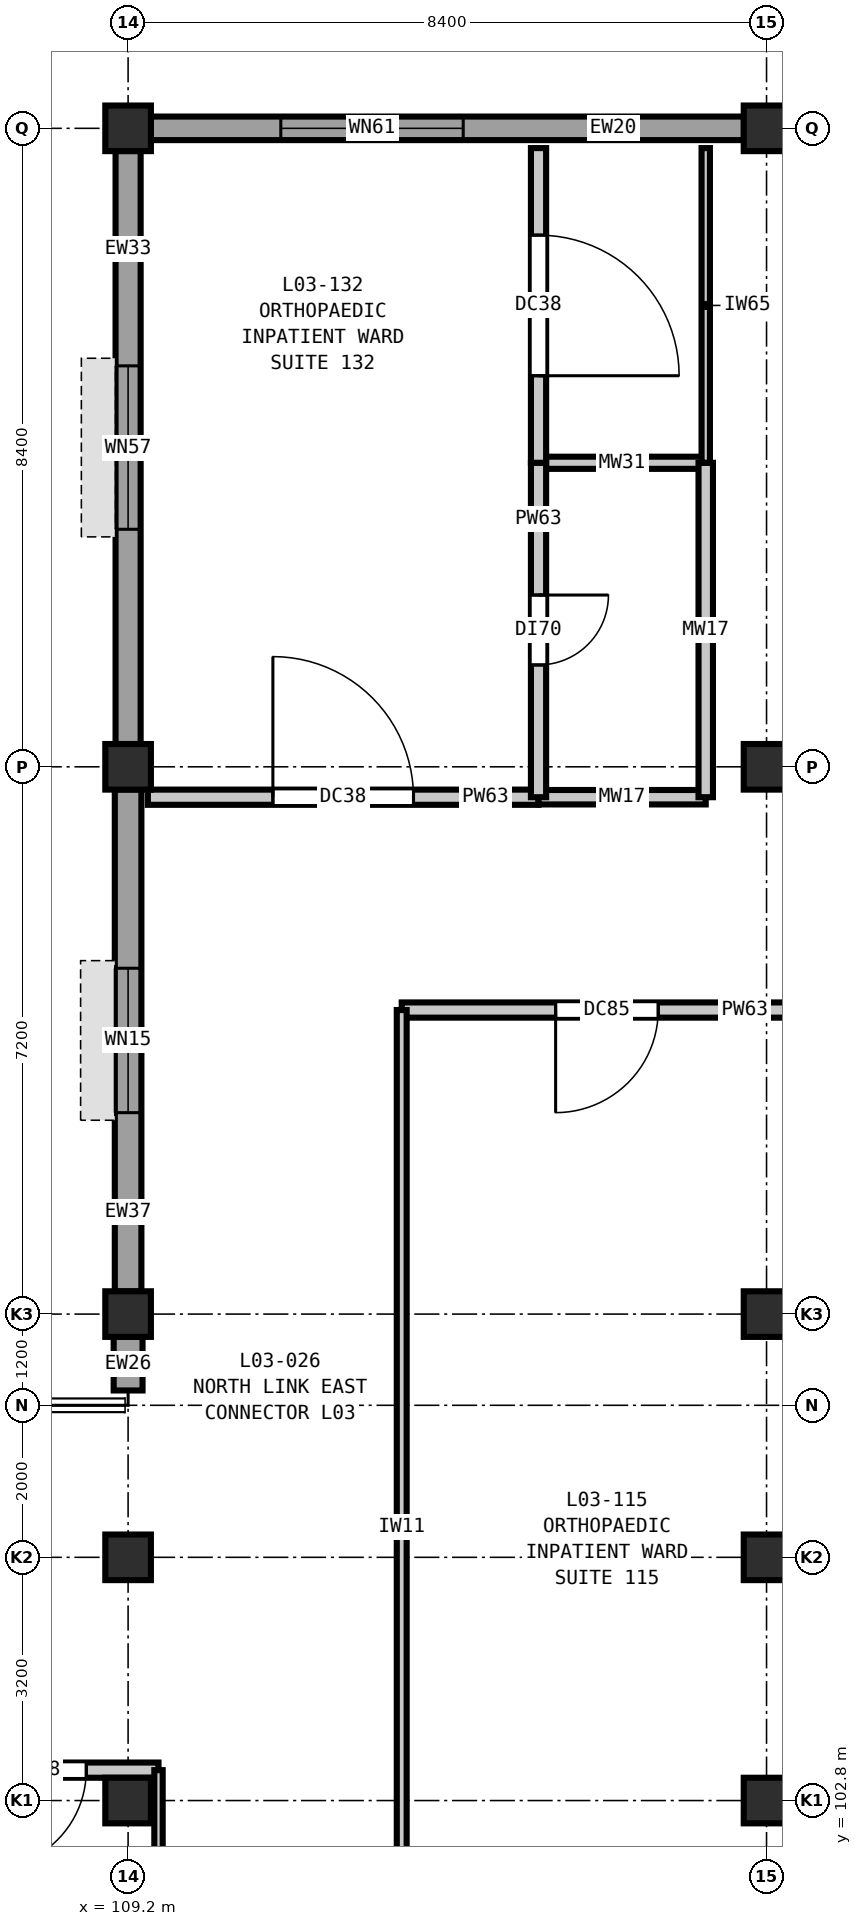
"""IFC4 building model, lengths in metres.
Left out: names, types, materials, properties, quantities, classifications, styles, units other than length and angle.
Written with IfcOpenShell. Run it as: python <this file> out.ifc"""

import sys

from ifc_helpers import new_model, si_unit, direction, frame, frame_2d, origin, origin_2d, place, context, subcontext, project, spatial, rectangle, extrude, element, fill, save


model = new_model("IFC4")
c1 = context("Model", 3, precision=1e-05, world=origin(), true_north=direction((0.0, 1.0)))
c2 = subcontext(c1, "Body", "Model", "MODEL_VIEW")
j1 = project(units=[si_unit("LENGTHUNIT", "METRE"), si_unit("PLANEANGLEUNIT", "RADIAN")], contexts=[c1])
p1 = place(None, origin())
s1 = spatial("IfcSite", under=j1, at=p1, CompositionType="ELEMENT")
p2 = place(p1, origin())
s2 = spatial("IfcBuilding", under=s1, at=p2, CompositionType="ELEMENT")
p3 = place(p2, frame((0.0, 0.0, 16.2)))
s3 = spatial("IfcBuildingStorey", under=s2, at=p3, CompositionType="ELEMENT", Elevation=16.2)
for number, where, z_axis, x_axis in (
    (1, (109.2, 102.8, 0.0), (0.0, 0.0, 1.0), (1.0, 0.0, 0.0)),
    (2, (109.2, 106.0, 0.0), (0.0, 0.0, 1.0), (1.0, 0.0, 0.0)),
    (3, (109.2, 109.2, 0.0), (0.0, 0.0, 1.0), (1.0, 0.0, 0.0)),
    (4, (109.2, 116.4, 0.0), (0.0, 0.0, 1.0), (1.0, 0.0, 0.0)),
    (5, (109.2, 124.8, 0.0), (0.0, 0.0, 1.0), (1.0, 0.0, 0.0)),
    (6, (117.6, 102.8, 0.0), (0.0, 0.0, 1.0), (1.0, 0.0, 0.0)),
    (7, (117.6, 106.0, 0.0), (0.0, 0.0, 1.0), (1.0, 0.0, 0.0)),
    (8, (117.6, 109.2, 0.0), (0.0, 0.0, 1.0), (1.0, 0.0, 0.0)),
    (9, (117.6, 116.4, 0.0), (0.0, 0.0, 1.0), (1.0, 0.0, 0.0)),
    (10, (117.6, 124.8, 0.0), (0.0, 0.0, 1.0), (1.0, 0.0, 0.0)),
):
    element("IfcColumn", number, at=place(p3, frame(where, z_axis=z_axis, x_axis=x_axis)), inside=s3, PredefinedType="COLUMN", context=c2, shape_type="SweptSolid", body=[
        extrude(rectangle(XDim=0.6, YDim=0.6, at=origin_2d()), origin(), (0.0, 0.0, 1.0), 4.2),
    ])
p4 = place(p3, frame((109.2, 108.195, 0.0), z_axis=(0.0, 0.0, 1.0), x_axis=(0.0, 1.0, 0.0)))
e11 = element("IfcWall", 11, at=p4, inside=s3, PredefinedType="SOLIDWALL", context=c2, shape_type="SweptSolid", body=[
    extrude(rectangle(XDim=0.707, YDim=0.38, at=frame_2d((0.354, 0.0))), origin(), (0.0, 0.0, 1.0), 3.48),
])
p5 = place(p3, frame((109.2, 109.498, 0.0), z_axis=(0.0, 0.0, 1.0), x_axis=(0.0, 1.0, 0.0)))
e12 = element("IfcWall", 12, at=p5, inside=s3, PredefinedType="SOLIDWALL", context=c2, shape_type="SweptSolid", body=[
    extrude(rectangle(XDim=6.604, YDim=0.35, at=frame_2d((3.302, 0.0))), origin(), (0.0, 0.0, 1.0), 3.48),
])
p6 = place(p5, frame((2.352, 0.0, 0.9)))
e13 = element("IfcOpeningElement", 13, at=p6, cuts=e12, PredefinedType="OPENING", context=c2, shape_type="SweptSolid", body=[
    extrude(rectangle(XDim=1.9, YDim=2.15, at=frame_2d((0.95, 1.075))), frame((0.0, 0.185, 0.0), z_axis=(0.0, -1.0, 0.0), x_axis=(1.0, 0.0, 0.0)), (0.0, 0.0, 1.0), 0.37),
])
p7 = place(p3, frame((109.2, 116.698, 0.0), z_axis=(0.0, 0.0, 1.0), x_axis=(0.0, 1.0, 0.0)))
e14 = element("IfcWall", 14, at=p7, inside=s3, PredefinedType="SOLIDWALL", context=c2, shape_type="SweptSolid", body=[
    extrude(rectangle(XDim=7.804, YDim=0.33, at=frame_2d((3.902, 0.0))), origin(), (0.0, 0.0, 1.0), 3.48),
])
p8 = place(p7, frame((2.827, 0.0, 0.9)))
e15 = element("IfcOpeningElement", 15, at=p8, cuts=e14, PredefinedType="OPENING", context=c2, shape_type="SweptSolid", body=[
    extrude(rectangle(XDim=2.15, YDim=2.15, at=frame_2d((1.075, 1.075))), frame((0.0, 0.175, 0.0), z_axis=(0.0, -1.0, 0.0), x_axis=(1.0, 0.0, 0.0)), (0.0, 0.0, 1.0), 0.35),
])
p9 = place(p3, frame((109.498, 124.8, 0.0), z_axis=(0.0, 0.0, 1.0), x_axis=(1.0, 0.0, 0.0)))
e16 = element("IfcWall", 16, at=p9, inside=s3, PredefinedType="SOLIDWALL", context=c2, shape_type="SweptSolid", body=[
    extrude(rectangle(XDim=7.804, YDim=0.31, at=frame_2d((3.902, 0.0))), origin(), (0.0, 0.0, 1.0), 3.48),
])
p10 = place(p9, frame((1.711, 0.0, 0.9)))
e17 = element("IfcOpeningElement", 17, at=p10, cuts=e16, PredefinedType="OPENING", context=c2, shape_type="SweptSolid", body=[
    extrude(rectangle(XDim=2.4, YDim=2.15, at=frame_2d((1.2, 1.075))), frame((0.0, 0.165, 0.0), z_axis=(0.0, -1.0, 0.0), x_axis=(1.0, 0.0, 0.0)), (0.0, 0.0, 1.0), 0.33),
])
p11 = place(p3, frame((106.4, 103.2, 0.0), z_axis=(0.0, 0.0, 1.0), x_axis=(1.0, 0.0, 0.0)))
e18 = element("IfcWall", 18, at=p11, inside=s3, PredefinedType="PARTITIONING", context=c2, shape_type="SweptSolid", body=[
    extrude(rectangle(XDim=3.2, YDim=0.2, at=frame_2d((1.6, 0.0))), origin(), (0.0, 0.0, 1.0), 3.89),
])
p12 = place(p11, frame((0.95, 0.0, 0.0)))
e19 = element("IfcOpeningElement", 19, at=p12, cuts=e18, PredefinedType="OPENING", context=c2, shape_type="SweptSolid", body=[
    extrude(rectangle(XDim=1.3, YDim=2.2, at=frame_2d((0.65, 1.1))), frame((0.0, 0.11, 0.0), z_axis=(0.0, -1.0, 0.0), x_axis=(1.0, 0.0, 0.0)), (0.0, 0.0, 1.0), 0.22),
])
p13 = place(p3, frame((112.8, 113.2, 0.0), z_axis=(0.0, 0.0, 1.0), x_axis=(1.0, 0.0, 0.0)))
e20 = element("IfcWall", 20, at=p13, inside=s3, PredefinedType="PARTITIONING", context=c2, shape_type="SweptSolid", body=[
    extrude(rectangle(XDim=5.4, YDim=0.2, at=frame_2d((2.7, 0.0))), origin(), (0.0, 0.0, 1.0), 3.89),
])
p14 = place(p13, frame((2.025, 0.0, 0.0)))
e21 = element("IfcOpeningElement", 21, at=p14, cuts=e20, PredefinedType="OPENING", context=c2, shape_type="SweptSolid", body=[
    extrude(rectangle(XDim=1.35, YDim=2.2, at=frame_2d((0.675, 1.1))), frame((0.0, 0.11, 0.0), z_axis=(0.0, -1.0, 0.0), x_axis=(1.0, 0.0, 0.0)), (0.0, 0.0, 1.0), 0.22),
])
p15 = place(p3, frame((109.46, 116.0, 0.0), z_axis=(0.0, 0.0, 1.0), x_axis=(1.0, 0.0, 0.0)))
e22 = element("IfcWall", 22, at=p15, inside=s3, PredefinedType="PARTITIONING", context=c2, shape_type="SweptSolid", body=[
    extrude(rectangle(XDim=5.14, YDim=0.2, at=frame_2d((2.57, 0.0))), origin(), (0.0, 0.0, 1.0), 3.89),
])
p16 = place(p15, frame((1.645, 0.0, 0.0)))
e23 = element("IfcOpeningElement", 23, at=p16, cuts=e22, PredefinedType="OPENING", context=c2, shape_type="SweptSolid", body=[
    extrude(rectangle(XDim=1.85, YDim=2.3, at=frame_2d((0.925, 1.15))), frame((0.0, 0.11, 0.0), z_axis=(0.0, -1.0, 0.0), x_axis=(1.0, 0.0, 0.0)), (0.0, 0.0, 1.0), 0.22),
])
p17 = place(p3, frame((114.6, 116.0, 0.0), z_axis=(0.0, 0.0, 1.0), x_axis=(1.0, 0.0, 0.0)))
e24 = element("IfcWall", 24, at=p17, inside=s3, PredefinedType="PLUMBINGWALL", context=c2, shape_type="SweptSolid", body=[
    extrude(rectangle(XDim=2.2, YDim=0.19, at=frame_2d((1.1, 0.0))), origin(), (0.0, 0.0, 1.0), 3.89),
])
p18 = place(p3, frame((114.6, 120.4, 0.0), z_axis=(0.0, 0.0, 1.0), x_axis=(1.0, 0.0, 0.0)))
e25 = element("IfcWall", 25, at=p18, inside=s3, PredefinedType="PLUMBINGWALL", context=c2, shape_type="SweptSolid", body=[
    extrude(rectangle(XDim=2.2, YDim=0.16, at=frame_2d((1.1, 0.0))), origin(), (0.0, 0.0, 1.0), 3.89),
])
p19 = place(p3, frame((109.6, 99.6, 0.0), z_axis=(0.0, 0.0, 1.0), x_axis=(0.0, 1.0, 0.0)))
e26 = element("IfcWall", 26, at=p19, inside=s3, PredefinedType="PARTITIONING", context=c2, shape_type="SweptSolid", body=[
    extrude(rectangle(XDim=3.6, YDim=0.11, at=frame_2d((1.8, 0.0))), origin(), (0.0, 0.0, 1.0), 3.89),
])
p20 = place(p3, frame((112.8, 99.6, 0.0), z_axis=(0.0, 0.0, 1.0), x_axis=(0.0, 1.0, 0.0)))
e27 = element("IfcWall", 27, at=p20, inside=s3, PredefinedType="PARTITIONING", context=c2, shape_type="SweptSolid", body=[
    extrude(rectangle(XDim=13.6, YDim=0.13, at=frame_2d((6.8, 0.0))), origin(), (0.0, 0.0, 1.0), 3.89),
])
p21 = place(p3, frame((114.6, 116.0, 0.0), z_axis=(0.0, 0.0, 1.0), x_axis=(0.0, 1.0, 0.0)))
e28 = element("IfcWall", 28, at=p21, inside=s3, PredefinedType="PARTITIONING", context=c2, shape_type="SweptSolid", body=[
    extrude(rectangle(XDim=4.4, YDim=0.2, at=frame_2d((2.2, 0.0))), origin(), (0.0, 0.0, 1.0), 3.89),
])
p22 = place(p21, frame((1.74, 0.0, 0.0)))
e29 = element("IfcOpeningElement", 29, at=p22, cuts=e28, PredefinedType="OPENING", context=c2, shape_type="SweptSolid", body=[
    extrude(rectangle(XDim=0.92, YDim=2.1, at=frame_2d((0.46, 1.05))), frame((0.0, 0.11, 0.0), z_axis=(0.0, -1.0, 0.0), x_axis=(1.0, 0.0, 0.0)), (0.0, 0.0, 1.0), 0.22),
])
p23 = place(p3, frame((114.6, 120.4, 0.0), z_axis=(0.0, 0.0, 1.0), x_axis=(0.0, 1.0, 0.0)))
e30 = element("IfcWall", 30, at=p23, inside=s3, PredefinedType="PARTITIONING", context=c2, shape_type="SweptSolid", body=[
    extrude(rectangle(XDim=4.14, YDim=0.2, at=frame_2d((2.07, 0.0))), origin(), (0.0, 0.0, 1.0), 3.89),
])
p24 = place(p23, frame((1.145, 0.0, 0.0)))
e31 = element("IfcOpeningElement", 31, at=p24, cuts=e30, PredefinedType="OPENING", context=c2, shape_type="SweptSolid", body=[
    extrude(rectangle(XDim=1.85, YDim=2.3, at=frame_2d((0.925, 1.15))), frame((0.0, 0.11, 0.0), z_axis=(0.0, -1.0, 0.0), x_axis=(1.0, 0.0, 0.0)), (0.0, 0.0, 1.0), 0.22),
])
p25 = place(p3, frame((116.8, 116.0, 0.0), z_axis=(0.0, 0.0, 1.0), x_axis=(0.0, 1.0, 0.0)))
e32 = element("IfcWall", 32, at=p25, inside=s3, PredefinedType="PLUMBINGWALL", context=c2, shape_type="SweptSolid", body=[
    extrude(rectangle(XDim=4.4, YDim=0.19, at=frame_2d((2.2, 0.0))), origin(), (0.0, 0.0, 1.0), 3.89),
])
p26 = place(p3, frame((116.8, 120.4, 0.0), z_axis=(0.0, 0.0, 1.0), x_axis=(0.0, 1.0, 0.0)))
e33 = element("IfcWall", 33, at=p26, inside=s3, PredefinedType="PARTITIONING", context=c2, shape_type="SweptSolid", body=[
    extrude(rectangle(XDim=4.14, YDim=0.11, at=frame_2d((2.07, 0.0))), origin(), (0.0, 0.0, 1.0), 3.89),
])
p27 = place(p6, origin())
e34 = element("IfcWindow", 34, at=p27, inside=s3, PartitioningType="DOUBLE_PANEL_VERTICAL", PredefinedType="WINDOW", context=c2, shape_type="SweptSolid", body=[
    extrude(rectangle(XDim=1.9, YDim=2.15, at=frame_2d((0.95, 1.075))), frame((0.0, 0.03, 0.0), z_axis=(0.0, -1.0, 0.0), x_axis=(1.0, 0.0, 0.0)), (0.0, 0.0, 1.0), 0.06),
])
fill(e13, e34)
p28 = place(p8, origin())
e35 = element("IfcWindow", 35, at=p28, inside=s3, PartitioningType="DOUBLE_PANEL_VERTICAL", PredefinedType="WINDOW", context=c2, shape_type="SweptSolid", body=[
    extrude(rectangle(XDim=2.15, YDim=2.15, at=frame_2d((1.075, 1.075))), frame((0.0, 0.03, 0.0), z_axis=(0.0, -1.0, 0.0), x_axis=(1.0, 0.0, 0.0)), (0.0, 0.0, 1.0), 0.06),
])
fill(e15, e35)
p29 = place(p10, origin())
e36 = element("IfcWindow", 36, at=p29, inside=s3, PartitioningType="DOUBLE_PANEL_VERTICAL", PredefinedType="WINDOW", context=c2, shape_type="SweptSolid", body=[
    extrude(rectangle(XDim=2.4, YDim=2.15, at=frame_2d((1.2, 1.075))), frame((0.0, 0.03, 0.0), z_axis=(0.0, -1.0, 0.0), x_axis=(1.0, 0.0, 0.0)), (0.0, 0.0, 1.0), 0.06),
])
fill(e17, e36)
p30 = place(p12, frame((1.3, 0.0, 0.0), z_axis=(0.0, 0.0, 1.0), x_axis=(-1.0, 0.0, 0.0)))
e37 = element("IfcDoor", 37, at=p30, inside=s3, OperationType="SINGLE_SWING_RIGHT", PredefinedType="DOOR", context=c2, shape_type="SweptSolid", body=[
    extrude(rectangle(XDim=1.3, YDim=2.2, at=frame_2d((0.65, 1.1))), frame((0.0, 0.025, 0.0), z_axis=(0.0, -1.0, 0.0), x_axis=(1.0, 0.0, 0.0)), (0.0, 0.0, 1.0), 0.05),
])
fill(e19, e37)
p31 = place(p14, frame((1.35, 0.0, 0.0), z_axis=(0.0, 0.0, 1.0), x_axis=(-1.0, 0.0, 0.0)))
e38 = element("IfcDoor", 38, at=p31, inside=s3, OperationType="SINGLE_SWING_RIGHT", PredefinedType="DOOR", context=c2, shape_type="SweptSolid", body=[
    extrude(rectangle(XDim=1.35, YDim=2.2, at=frame_2d((0.675, 1.1))), frame((0.0, 0.025, 0.0), z_axis=(0.0, -1.0, 0.0), x_axis=(1.0, 0.0, 0.0)), (0.0, 0.0, 1.0), 0.05),
])
fill(e21, e38)
p32 = place(p16, origin())
e39 = element("IfcDoor", 39, at=p32, inside=s3, OperationType="SINGLE_SWING_LEFT", PredefinedType="DOOR", context=c2, shape_type="SweptSolid", body=[
    extrude(rectangle(XDim=1.85, YDim=2.3, at=frame_2d((0.925, 1.15))), frame((0.0, 0.025, 0.0), z_axis=(0.0, -1.0, 0.0), x_axis=(1.0, 0.0, 0.0)), (0.0, 0.0, 1.0), 0.05),
])
fill(e23, e39)
p33 = place(p22, frame((0.92, 0.0, 0.0), z_axis=(0.0, 0.0, 1.0), x_axis=(-1.0, 0.0, 0.0)))
e40 = element("IfcDoor", 40, at=p33, inside=s3, OperationType="SINGLE_SWING_LEFT", PredefinedType="DOOR", context=c2, shape_type="SweptSolid", body=[
    extrude(rectangle(XDim=0.92, YDim=2.1, at=frame_2d((0.46, 1.05))), frame((0.0, 0.025, 0.0), z_axis=(0.0, -1.0, 0.0), x_axis=(1.0, 0.0, 0.0)), (0.0, 0.0, 1.0), 0.05),
])
fill(e29, e40)
p34 = place(p24, frame((1.85, 0.0, 0.0), z_axis=(0.0, 0.0, 1.0), x_axis=(-1.0, 0.0, 0.0)))
e41 = element("IfcDoor", 41, at=p34, inside=s3, OperationType="SINGLE_SWING_RIGHT", PredefinedType="DOOR", context=c2, shape_type="SweptSolid", body=[
    extrude(rectangle(XDim=1.85, YDim=2.3, at=frame_2d((0.925, 1.15))), frame((0.0, 0.025, 0.0), z_axis=(0.0, -1.0, 0.0), x_axis=(1.0, 0.0, 0.0)), (0.0, 0.0, 1.0), 0.05),
])
fill(e31, e41)
save(model, sys.argv[1])
